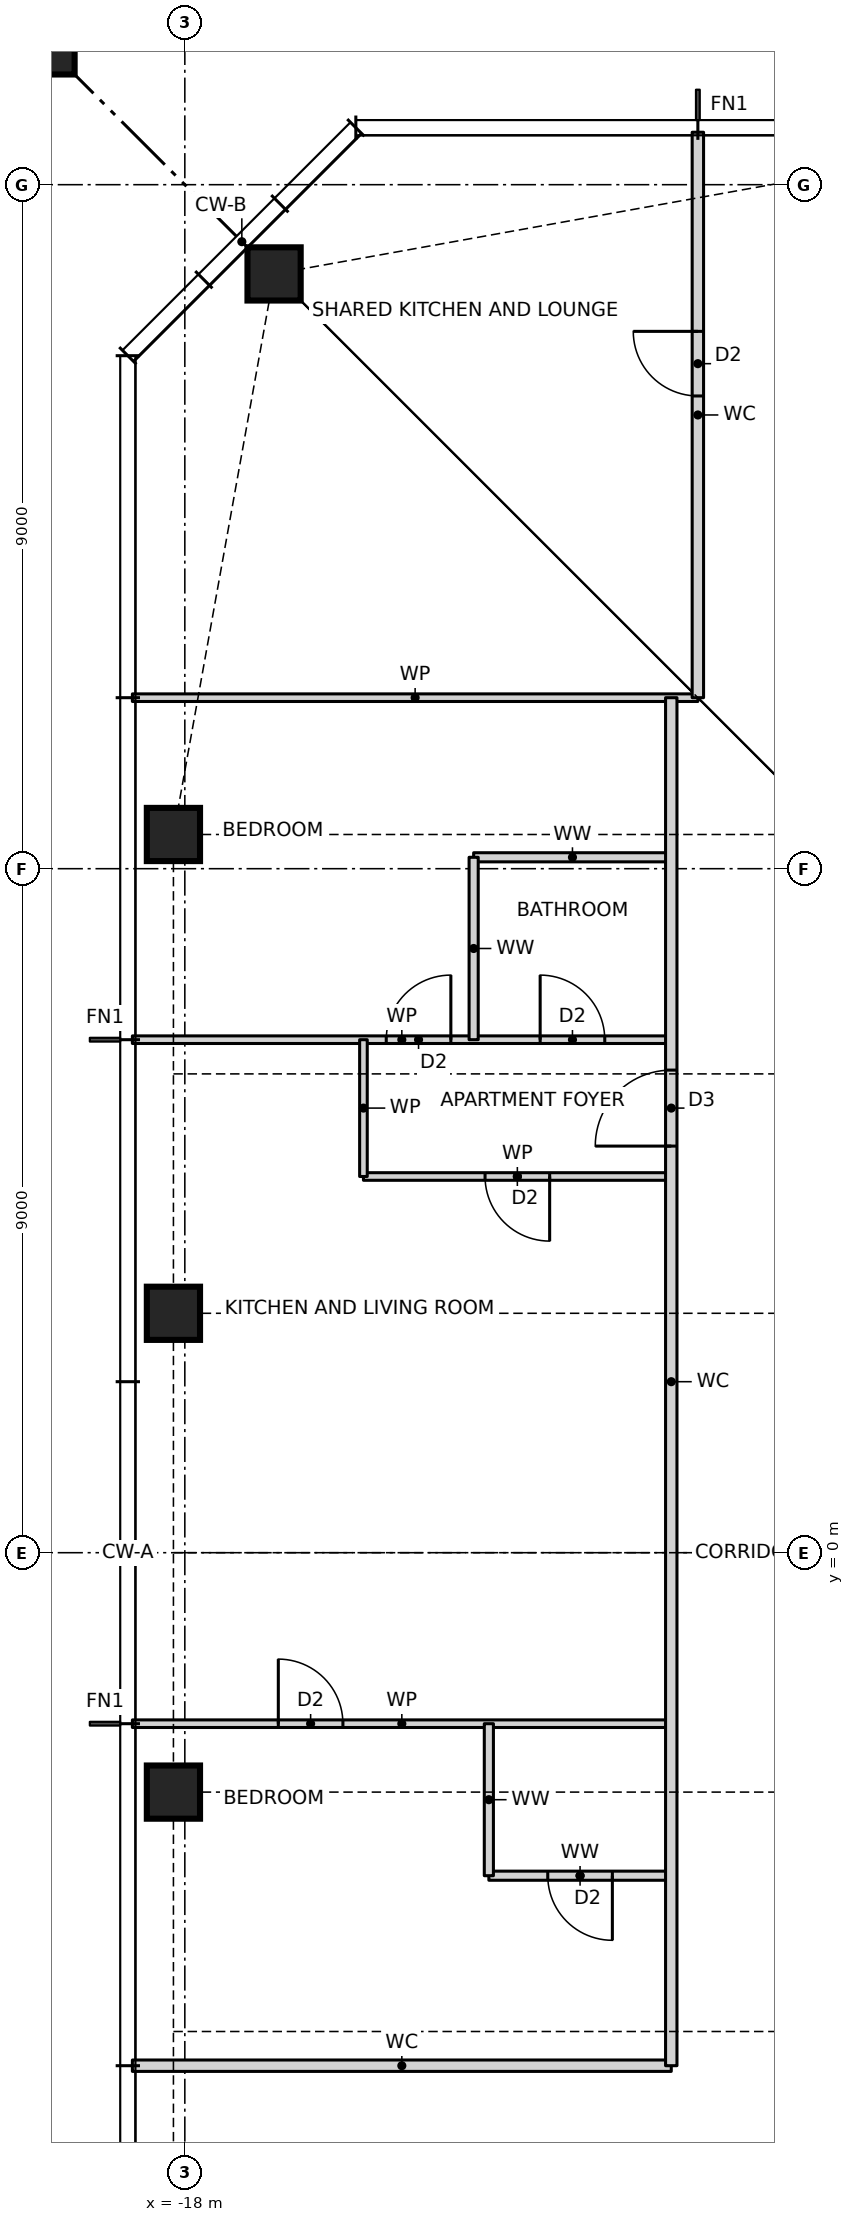
"""IFC4 building model, lengths in metres.
Left out: names, types, materials, properties, quantities, classifications, styles, units other than length and angle.
Written with IfcOpenShell. Run it as: python <this file> out.ifc"""

import sys

from ifc_helpers import new_model, si_unit, direction, frame, frame_2d, origin, origin_2d, place, context, subcontext, project, spatial, rectangle, hollow_rectangle, i_section, extrude, element, fill, save


model = new_model("IFC4")
c1 = context("Model", 3, precision=1e-05, world=origin(), true_north=direction((0.0, 1.0)))
c2 = subcontext(c1, "Body", "Model", "MODEL_VIEW")
j1 = project(units=[si_unit("LENGTHUNIT", "METRE"), si_unit("PLANEANGLEUNIT", "RADIAN")], contexts=[c1])
p1 = place(None, origin())
s1 = spatial("IfcSite", under=j1, at=p1, CompositionType="ELEMENT")
p2 = place(p1, origin())
s2 = spatial("IfcBuilding", under=s1, at=p2, CompositionType="ELEMENT")
p3 = place(p2, frame((0.0, 0.0, 177.5)))
s3 = spatial("IfcBuildingStorey", under=s2, at=p3, CompositionType="ELEMENT", Elevation=177.5)
for number, where, z_axis, x_axis in (
    (1, (-16.826, 16.826, 0.0), (0.0, 0.0, 1.0), (1.0, 0.0, 0.0)),
    (2, (-18.15, 9.45, 0.0), (0.0, 0.0, 1.0), (1.0, 0.0, 0.0)),
    (3, (-18.15, 3.15, 0.0), (0.0, 0.0, 1.0), (1.0, 0.0, 0.0)),
    (4, (-18.15, -3.15, 0.0), (0.0, 0.0, 1.0), (1.0, 0.0, 0.0)),
):
    element("IfcColumn", number, at=place(p3, frame(where, z_axis=z_axis, x_axis=x_axis)), inside=s3, PredefinedType="COLUMN", context=c2, shape_type="SweptSolid", body=[
        extrude(hollow_rectangle(XDim=0.7, YDim=0.7, WallThickness=0.06, at=origin_2d()), origin(), (0.0, 0.0, 1.0), 3.5),
    ])
p4 = place(p3, frame((-21.65, 21.65, 0.0), z_axis=(0.0, 0.0, 1.0), x_axis=(1.0, 0.0, 0.0)))
e5 = element("IfcColumn", 5, at=p4, inside=s3, PredefinedType="COLUMN", context=c2, shape_type="SweptSolid", body=[
    extrude(rectangle(XDim=4.4, YDim=4.4, at=origin_2d()), origin(), (0.0, 0.0, 1.0), 3.5),
    extrude(i_section(OverallWidth=0.478, OverallDepth=0.599, WebThickness=0.1, FlangeThickness=0.14, at=origin_2d()), origin(), (0.0, 0.0, 1.0), 3.5),
])
p5 = place(p3, frame((-18.69, -6.75, 0.0), z_axis=(0.0, 0.0, 1.0), x_axis=(1.0, 0.0, 0.0)))
e6 = element("IfcWall", 6, at=p5, inside=s3, PredefinedType="PARTITIONING", context=c2, shape_type="SweptSolid", body=[
    extrude(rectangle(XDim=7.09, YDim=0.15, at=frame_2d((3.545, 0.0))), origin(), (0.0, 0.0, 1.0), 3.27),
])
p6 = place(p3, frame((-14.0, -4.25, 0.0), z_axis=(0.0, 0.0, 1.0), x_axis=(1.0, 0.0, 0.0)))
e7 = element("IfcWall", 7, at=p6, inside=s3, PredefinedType="PARTITIONING", context=c2, shape_type="SweptSolid", body=[
    extrude(rectangle(XDim=2.4, YDim=0.12, at=frame_2d((1.2, 0.0))), origin(), (0.0, 0.0, 1.0), 3.27),
])
p7 = place(p6, frame((0.775, 0.0, 0.0)))
e8 = element("IfcOpeningElement", 8, at=p7, cuts=e7, PredefinedType="OPENING", context=c2, shape_type="SweptSolid", body=[
    extrude(rectangle(XDim=0.85, YDim=2.1, at=frame_2d((0.425, 1.05))), frame((0.0, 0.07, 0.0), z_axis=(0.0, -1.0, 0.0), x_axis=(1.0, 0.0, 0.0)), (0.0, 0.0, 1.0), 0.14),
])
p8 = place(p3, frame((-18.69, -2.25, 0.0), z_axis=(0.0, 0.0, 1.0), x_axis=(1.0, 0.0, 0.0)))
e9 = element("IfcWall", 9, at=p8, inside=s3, PredefinedType="PARTITIONING", context=c2, shape_type="SweptSolid", body=[
    extrude(rectangle(XDim=7.09, YDim=0.1, at=frame_2d((3.545, 0.0))), origin(), (0.0, 0.0, 1.0), 3.27),
])
p9 = place(p8, frame((1.92, 0.0, 0.0)))
e10 = element("IfcOpeningElement", 10, at=p9, cuts=e9, PredefinedType="OPENING", context=c2, shape_type="SweptSolid", body=[
    extrude(rectangle(XDim=0.85, YDim=2.1, at=frame_2d((0.425, 1.05))), frame((0.0, 0.06, 0.0), z_axis=(0.0, -1.0, 0.0), x_axis=(1.0, 0.0, 0.0)), (0.0, 0.0, 1.0), 0.12),
])
p10 = place(p3, frame((-15.65, 4.95, 0.0), z_axis=(0.0, 0.0, 1.0), x_axis=(1.0, 0.0, 0.0)))
e11 = element("IfcWall", 11, at=p10, inside=s3, PredefinedType="PARTITIONING", context=c2, shape_type="SweptSolid", body=[
    extrude(rectangle(XDim=4.05, YDim=0.1, at=frame_2d((2.025, 0.0))), origin(), (0.0, 0.0, 1.0), 3.27),
])
p11 = place(p10, frame((1.6, 0.0, 0.0)))
e12 = element("IfcOpeningElement", 12, at=p11, cuts=e11, PredefinedType="OPENING", context=c2, shape_type="SweptSolid", body=[
    extrude(rectangle(XDim=0.85, YDim=2.1, at=frame_2d((0.425, 1.05))), frame((0.0, 0.06, 0.0), z_axis=(0.0, -1.0, 0.0), x_axis=(1.0, 0.0, 0.0)), (0.0, 0.0, 1.0), 0.12),
])
p12 = place(p3, frame((-18.69, 6.75, 0.0), z_axis=(0.0, 0.0, 1.0), x_axis=(1.0, 0.0, 0.0)))
e13 = element("IfcWall", 13, at=p12, inside=s3, PredefinedType="PARTITIONING", context=c2, shape_type="SweptSolid", body=[
    extrude(rectangle(XDim=7.09, YDim=0.1, at=frame_2d((3.545, 0.0))), origin(), (0.0, 0.0, 1.0), 3.27),
])
p13 = place(p12, frame((3.34, 0.0, 0.0)))
e14 = element("IfcOpeningElement", 14, at=p13, cuts=e13, PredefinedType="OPENING", context=c2, shape_type="SweptSolid", body=[
    extrude(rectangle(XDim=0.85, YDim=2.1, at=frame_2d((0.425, 1.05))), frame((0.0, 0.06, 0.0), z_axis=(0.0, -1.0, 0.0), x_axis=(1.0, 0.0, 0.0)), (0.0, 0.0, 1.0), 0.12),
])
p14 = place(p12, frame((5.365, 0.0, 0.0)))
e15 = element("IfcOpeningElement", 15, at=p14, cuts=e13, PredefinedType="OPENING", context=c2, shape_type="SweptSolid", body=[
    extrude(rectangle(XDim=0.85, YDim=2.1, at=frame_2d((0.425, 1.05))), frame((0.0, 0.06, 0.0), z_axis=(0.0, -1.0, 0.0), x_axis=(1.0, 0.0, 0.0)), (0.0, 0.0, 1.0), 0.12),
])
p15 = place(p3, frame((-14.2, 9.15, 0.0), z_axis=(0.0, 0.0, 1.0), x_axis=(1.0, 0.0, 0.0)))
e16 = element("IfcWall", 16, at=p15, inside=s3, PredefinedType="PARTITIONING", context=c2, shape_type="SweptSolid", body=[
    extrude(rectangle(XDim=2.6, YDim=0.12, at=frame_2d((1.3, 0.0))), origin(), (0.0, 0.0, 1.0), 3.27),
])
p16 = place(p3, frame((-18.69, 11.25, 0.0), z_axis=(0.0, 0.0, 1.0), x_axis=(1.0, 0.0, 0.0)))
e17 = element("IfcWall", 17, at=p16, inside=s3, PredefinedType="PARTITIONING", context=c2, shape_type="SweptSolid", body=[
    extrude(rectangle(XDim=7.44, YDim=0.1, at=frame_2d((3.72, 0.0))), origin(), (0.0, 0.0, 1.0), 3.27),
])
p17 = place(p3, frame((-11.25, 11.25, 0.0), z_axis=(0.0, 0.0, 1.0), x_axis=(0.0, 1.0, 0.0)))
e18 = element("IfcWall", 18, at=p17, inside=s3, PredefinedType="PARTITIONING", context=c2, shape_type="SweptSolid", body=[
    extrude(rectangle(XDim=7.44, YDim=0.15, at=frame_2d((3.72, 0.0))), origin(), (0.0, 0.0, 1.0), 3.27),
])
p18 = place(p17, frame((3.97, 0.0, 0.0)))
e19 = element("IfcOpeningElement", 19, at=p18, cuts=e18, PredefinedType="OPENING", context=c2, shape_type="SweptSolid", body=[
    extrude(rectangle(XDim=0.85, YDim=2.1, at=frame_2d((0.425, 1.05))), frame((0.0, 0.085, 0.0), z_axis=(0.0, -1.0, 0.0), x_axis=(1.0, 0.0, 0.0)), (0.0, 0.0, 1.0), 0.17),
])
p19 = place(p3, frame((-11.6, -6.75, 0.0), z_axis=(0.0, 0.0, 1.0), x_axis=(0.0, 1.0, 0.0)))
e20 = element("IfcWall", 20, at=p19, inside=s3, PredefinedType="PARTITIONING", context=c2, shape_type="SweptSolid", body=[
    extrude(rectangle(XDim=18.0, YDim=0.15, at=frame_2d((9.0, 0.0))), origin(), (0.0, 0.0, 1.0), 3.27),
])
p20 = place(p19, frame((12.1, 0.0, 0.0)))
e21 = element("IfcOpeningElement", 21, at=p20, cuts=e20, PredefinedType="OPENING", context=c2, shape_type="SweptSolid", body=[
    extrude(rectangle(XDim=1.0, YDim=2.1, at=frame_2d((0.5, 1.05))), frame((0.0, 0.085, 0.0), z_axis=(0.0, -1.0, 0.0), x_axis=(1.0, 0.0, 0.0)), (0.0, 0.0, 1.0), 0.17),
])
p21 = place(p3, frame((-14.0, -4.25, 0.0), z_axis=(0.0, 0.0, 1.0), x_axis=(0.0, 1.0, 0.0)))
e22 = element("IfcWall", 22, at=p21, inside=s3, PredefinedType="PARTITIONING", context=c2, shape_type="SweptSolid", body=[
    extrude(rectangle(XDim=2.0, YDim=0.12, at=frame_2d((1.0, 0.0))), origin(), (0.0, 0.0, 1.0), 3.27),
])
p22 = place(p3, frame((-14.2, 6.75, 0.0), z_axis=(0.0, 0.0, 1.0), x_axis=(0.0, 1.0, 0.0)))
e23 = element("IfcWall", 23, at=p22, inside=s3, PredefinedType="PARTITIONING", context=c2, shape_type="SweptSolid", body=[
    extrude(rectangle(XDim=2.4, YDim=0.12, at=frame_2d((1.2, 0.0))), origin(), (0.0, 0.0, 1.0), 3.27),
])
p23 = place(p3, frame((-15.65, 4.95, 0.0), z_axis=(0.0, 0.0, 1.0), x_axis=(0.0, 1.0, 0.0)))
e24 = element("IfcWall", 24, at=p23, inside=s3, PredefinedType="PARTITIONING", context=c2, shape_type="SweptSolid", body=[
    extrude(rectangle(XDim=1.8, YDim=0.1, at=frame_2d((0.9, 0.0))), origin(), (0.0, 0.0, 1.0), 3.27),
])
p24 = place(p20, origin())
e25 = element("IfcDoor", 25, at=p24, inside=s3, OperationType="SINGLE_SWING_LEFT", PredefinedType="DOOR", context=c2, shape_type="SweptSolid", body=[
    extrude(rectangle(XDim=1.0, YDim=2.1, at=frame_2d((0.5, 1.05))), frame((0.0, 0.025, 0.0), z_axis=(0.0, -1.0, 0.0), x_axis=(1.0, 0.0, 0.0)), (0.0, 0.0, 1.0), 0.05),
])
fill(e21, e25)
p25 = place(p11, frame((0.85, 0.0, 0.0), z_axis=(0.0, 0.0, 1.0), x_axis=(-1.0, 0.0, 0.0)))
e26 = element("IfcDoor", 26, at=p25, inside=s3, OperationType="SINGLE_SWING_LEFT", PredefinedType="DOOR", context=c2, shape_type="SweptSolid", body=[
    extrude(rectangle(XDim=0.85, YDim=2.1, at=frame_2d((0.425, 1.05))), frame((0.0, 0.025, 0.0), z_axis=(0.0, -1.0, 0.0), x_axis=(1.0, 0.0, 0.0)), (0.0, 0.0, 1.0), 0.05),
])
fill(e12, e26)
p26 = place(p13, origin())
e27 = element("IfcDoor", 27, at=p26, inside=s3, OperationType="SINGLE_SWING_RIGHT", PredefinedType="DOOR", context=c2, shape_type="SweptSolid", body=[
    extrude(rectangle(XDim=0.85, YDim=2.1, at=frame_2d((0.425, 1.05))), frame((0.0, 0.025, 0.0), z_axis=(0.0, -1.0, 0.0), x_axis=(1.0, 0.0, 0.0)), (0.0, 0.0, 1.0), 0.05),
])
fill(e14, e27)
p27 = place(p14, origin())
e28 = element("IfcDoor", 28, at=p27, inside=s3, OperationType="SINGLE_SWING_LEFT", PredefinedType="DOOR", context=c2, shape_type="SweptSolid", body=[
    extrude(rectangle(XDim=0.85, YDim=2.1, at=frame_2d((0.425, 1.05))), frame((0.0, 0.025, 0.0), z_axis=(0.0, -1.0, 0.0), x_axis=(1.0, 0.0, 0.0)), (0.0, 0.0, 1.0), 0.05),
])
fill(e15, e28)
p28 = place(p9, origin())
e29 = element("IfcDoor", 29, at=p28, inside=s3, OperationType="SINGLE_SWING_LEFT", PredefinedType="DOOR", context=c2, shape_type="SweptSolid", body=[
    extrude(rectangle(XDim=0.85, YDim=2.1, at=frame_2d((0.425, 1.05))), frame((0.0, 0.025, 0.0), z_axis=(0.0, -1.0, 0.0), x_axis=(1.0, 0.0, 0.0)), (0.0, 0.0, 1.0), 0.05),
])
fill(e10, e29)
p29 = place(p7, frame((0.85, 0.0, 0.0), z_axis=(0.0, 0.0, 1.0), x_axis=(-1.0, 0.0, 0.0)))
e30 = element("IfcDoor", 30, at=p29, inside=s3, OperationType="SINGLE_SWING_LEFT", PredefinedType="DOOR", context=c2, shape_type="SweptSolid", body=[
    extrude(rectangle(XDim=0.85, YDim=2.1, at=frame_2d((0.425, 1.05))), frame((0.0, 0.025, 0.0), z_axis=(0.0, -1.0, 0.0), x_axis=(1.0, 0.0, 0.0)), (0.0, 0.0, 1.0), 0.05),
])
fill(e8, e30)
p30 = place(p18, origin())
e31 = element("IfcDoor", 31, at=p30, inside=s3, OperationType="SINGLE_SWING_RIGHT", PredefinedType="DOOR", context=c2, shape_type="SweptSolid", body=[
    extrude(rectangle(XDim=0.85, YDim=2.1, at=frame_2d((0.425, 1.05))), frame((0.0, 0.025, 0.0), z_axis=(0.0, -1.0, 0.0), x_axis=(1.0, 0.0, 0.0)), (0.0, 0.0, 1.0), 0.05),
])
fill(e19, e31)
save(model, sys.argv[1])
